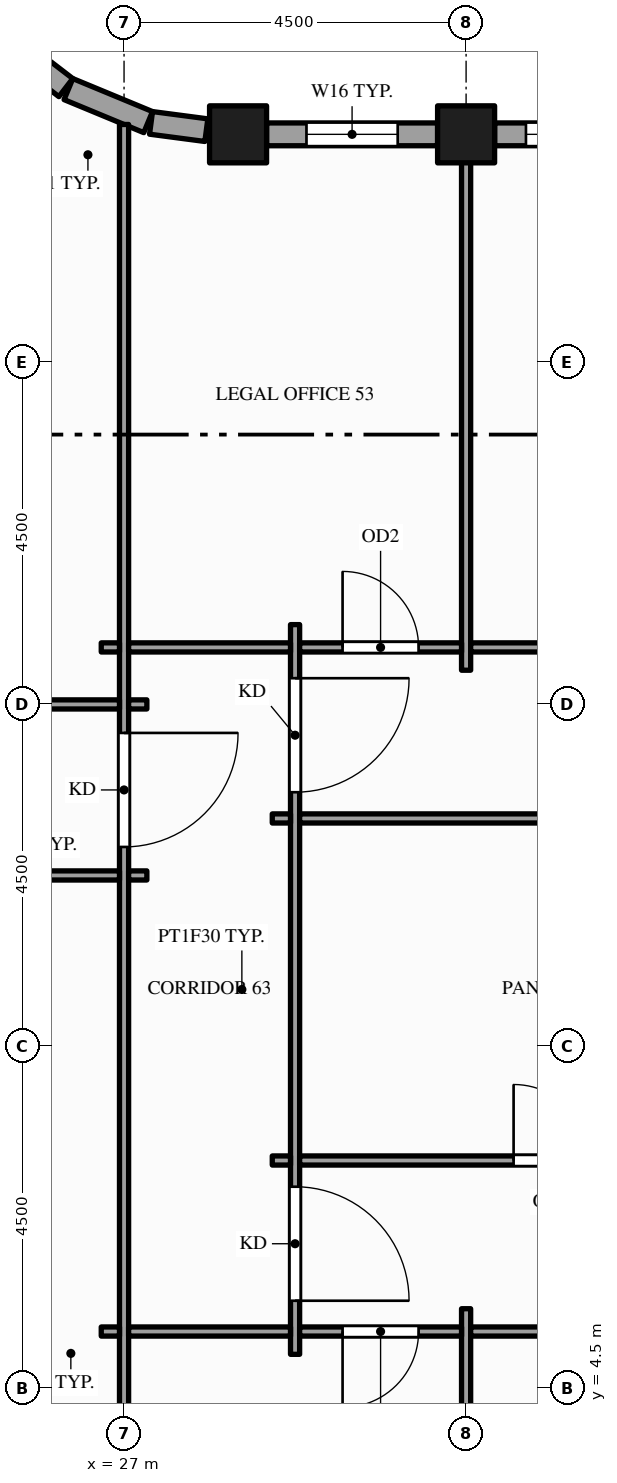
"""IFC4 building model, lengths in metres.
Left out: names, types, materials, properties, quantities, classifications, styles, units other than length and angle.
Written with IfcOpenShell. Run it as: python <this file> out.ifc"""

import sys

from ifc_helpers import new_model, si_unit, direction, frame, frame_2d, origin, origin_2d, place, context, subcontext, project, spatial, rectangle, hollow_rectangle, extrude, element, fill, save


model = new_model("IFC4")
c1 = context("Model", 3, precision=1e-05, world=origin(), true_north=direction((0.0, 1.0)))
c2 = subcontext(c1, "Body", "Model", "MODEL_VIEW")
j1 = project(units=[si_unit("LENGTHUNIT", "METRE"), si_unit("PLANEANGLEUNIT", "RADIAN")], contexts=[c1])
p1 = place(None, origin())
s1 = spatial("IfcSite", under=j1, at=p1, CompositionType="ELEMENT")
p2 = place(p1, origin())
s2 = spatial("IfcBuilding", under=s1, at=p2, CompositionType="ELEMENT")
p3 = place(p2, frame((0.0, 0.0, 207.0)))
s3 = spatial("IfcBuildingStorey", under=s2, at=p3, CompositionType="ELEMENT", Elevation=207.0)
for number, where, z_axis, x_axis in (
    (1, (28.5, 21.0, -0.15), (0.0, 0.0, 1.0), (1.0, 0.0, 0.0)),
    (2, (31.5, 21.0, -0.15), (0.0, 0.0, 1.0), (1.0, 0.0, 0.0)),
):
    element("IfcColumn", number, at=place(p3, frame(where, z_axis=z_axis, x_axis=x_axis)), inside=s3, PredefinedType="COLUMN", context=c2, shape_type="SweptSolid", body=[
        extrude(hollow_rectangle(XDim=0.75, YDim=0.75, WallThickness=0.036, at=origin_2d()), origin(), (0.0, 0.0, 1.0), 4.0),
    ])
p4 = place(p3, frame((35.625, 21.0, 0.0), z_axis=(0.0, 0.0, 1.0), x_axis=(-1.0, 0.0, 0.0)))
e3 = element("IfcWall", 3, at=p4, inside=s3, PredefinedType="STANDARD", context=c2, shape_type="SweptSolid", body=[
    extrude(rectangle(XDim=3.75, YDim=0.3, at=frame_2d((1.875, 0.0))), origin(), (0.0, 0.0, 1.0), 2.87),
])
p5 = place(p4, frame((0.413, 0.0, 0.9)))
e4 = element("IfcOpeningElement", 4, at=p5, cuts=e3, PredefinedType="OPENING", context=c2, shape_type="SweptSolid", body=[
    extrude(rectangle(XDim=1.15, YDim=1.75, at=frame_2d((0.575, 0.875))), frame((0.0, 0.16, 0.0), z_axis=(0.0, -1.0, 0.0), x_axis=(1.0, 0.0, 0.0)), (0.0, 0.0, 1.0), 0.32),
])
p6 = place(p4, frame((2.188, 0.0, 0.9)))
e5 = element("IfcOpeningElement", 5, at=p6, cuts=e3, PredefinedType="OPENING", context=c2, shape_type="SweptSolid", body=[
    extrude(rectangle(XDim=1.15, YDim=1.75, at=frame_2d((0.575, 0.875))), frame((0.0, 0.16, 0.0), z_axis=(0.0, -1.0, 0.0), x_axis=(1.0, 0.0, 0.0)), (0.0, 0.0, 1.0), 0.32),
])
p7 = place(p3, frame((31.125, 21.0, 0.0), z_axis=(0.0, 0.0, 1.0), x_axis=(-1.0, 0.0, 0.0)))
e6 = element("IfcWall", 6, at=p7, inside=s3, PredefinedType="STANDARD", context=c2, shape_type="SweptSolid", body=[
    extrude(rectangle(XDim=2.25, YDim=0.3, at=frame_2d((1.125, 0.0))), origin(), (0.0, 0.0, 1.0), 2.87),
])
p8 = place(p7, frame((0.525, 0.0, 0.9)))
e7 = element("IfcOpeningElement", 7, at=p8, cuts=e6, PredefinedType="OPENING", context=c2, shape_type="SweptSolid", body=[
    extrude(rectangle(XDim=1.2, YDim=1.75, at=frame_2d((0.6, 0.875))), frame((0.0, 0.16, 0.0), z_axis=(0.0, -1.0, 0.0), x_axis=(1.0, 0.0, 0.0)), (0.0, 0.0, 1.0), 0.32),
])
p9 = place(p3, frame((28.083, 21.055, 0.0), z_axis=(0.0, 0.0, 1.0), x_axis=(-0.99142711513, 0.130660917588, 0.0)))
e8 = element("IfcWall", 8, at=p9, inside=s3, PredefinedType="STANDARD", context=c2, shape_type="SweptSolid", body=[
    extrude(rectangle(XDim=0.734, YDim=0.3, at=frame_2d((0.367, 0.0))), origin(), (0.0, 0.0, 1.0), 3.157),
])
p10 = place(p3, frame((27.317, 21.161, 0.0), z_axis=(0.0, 0.0, 1.0), x_axis=(-0.923914616768, 0.382598720491, 0.0)))
e9 = element("IfcWall", 9, at=p10, inside=s3, PredefinedType="STANDARD", context=c2, shape_type="SweptSolid", body=[
    extrude(rectangle(XDim=1.135, YDim=0.3, at=frame_2d((0.568, 0.0))), origin(), (0.0, 0.0, 1.0), 2.87),
])
p11 = place(p3, frame((26.234, 21.615, 0.0), z_axis=(0.0, 0.0, 1.0), x_axis=(-0.793575131083, 0.608472276547, 0.0)))
e10 = element("IfcWall", 10, at=p11, inside=s3, PredefinedType="STANDARD", context=c2, shape_type="SweptSolid", body=[
    extrude(rectangle(XDim=0.629, YDim=0.3, at=frame_2d((0.314, 0.0))), origin(), (0.0, 0.0, 1.0), 3.157),
])
p12 = place(p3, frame((27.0, -1.35, 0.0), z_axis=(0.0, 0.0, 1.0), x_axis=(0.0, 1.0, 0.0)))
e11 = element("IfcWall", 11, at=p12, inside=s3, PredefinedType="PARTITIONING", context=c2, shape_type="SweptSolid", body=[
    extrude(rectangle(XDim=22.48, YDim=0.12, at=frame_2d((11.24, 0.0))), origin(), (0.0, 0.0, 1.0), 2.87),
])
p13 = place(p12, frame((12.975, 0.0, 0.0)))
e12 = element("IfcOpeningElement", 12, at=p13, cuts=e11, PredefinedType="OPENING", context=c2, shape_type="SweptSolid", body=[
    extrude(rectangle(XDim=1.5, YDim=2.1, at=frame_2d((0.75, 1.05))), frame((0.0, 0.07, 0.0), z_axis=(0.0, -1.0, 0.0), x_axis=(1.0, 0.0, 0.0)), (0.0, 0.0, 1.0), 0.14),
])
p14 = place(p3, frame((29.25, 4.95, 0.0), z_axis=(0.0, 0.0, 1.0), x_axis=(0.0, 1.0, 0.0)))
e13 = element("IfcWall", 13, at=p14, inside=s3, PredefinedType="PARTITIONING", context=c2, shape_type="SweptSolid", body=[
    extrude(rectangle(XDim=9.6, YDim=0.12, at=frame_2d((4.8, 0.0))), origin(), (0.0, 0.0, 1.0), 2.87),
])
p15 = place(p14, frame((0.705, 0.0, 0.0)))
e14 = element("IfcOpeningElement", 14, at=p15, cuts=e13, PredefinedType="OPENING", context=c2, shape_type="SweptSolid", body=[
    extrude(rectangle(XDim=1.5, YDim=2.1, at=frame_2d((0.75, 1.05))), frame((0.0, 0.07, 0.0), z_axis=(0.0, -1.0, 0.0), x_axis=(1.0, 0.0, 0.0)), (0.0, 0.0, 1.0), 0.14),
])
p16 = place(p14, frame((7.395, 0.0, 0.0)))
e15 = element("IfcOpeningElement", 15, at=p16, cuts=e13, PredefinedType="OPENING", context=c2, shape_type="SweptSolid", body=[
    extrude(rectangle(XDim=1.5, YDim=2.1, at=frame_2d((0.75, 1.05))), frame((0.0, 0.07, 0.0), z_axis=(0.0, -1.0, 0.0), x_axis=(1.0, 0.0, 0.0)), (0.0, 0.0, 1.0), 0.14),
])
for number, where, z_axis, x_axis in (
    (16, (31.5, -1.35, 0.0), (0.0, 0.0, 1.0), (0.0, 1.0, 0.0)),
    (17, (31.5, 13.95, 0.0), (0.0, 0.0, 1.0), (0.0, 1.0, 0.0)),
):
    element("IfcWall", number, at=place(p3, frame(where, z_axis=z_axis, x_axis=x_axis)), inside=s3, PredefinedType="PARTITIONING", context=c2, shape_type="SweptSolid", body=[
        extrude(rectangle(XDim=6.9, YDim=0.12, at=frame_2d((3.45, 0.0))), origin(), (0.0, 0.0, 1.0), 2.87),
    ])
p17 = place(p3, frame((26.7, 5.25, 0.0), z_axis=(0.0, 0.0, 1.0), x_axis=(1.0, 0.0, 0.0)))
e18 = element("IfcWall", 18, at=p17, inside=s3, PredefinedType="PARTITIONING", context=c2, shape_type="SweptSolid", body=[
    extrude(rectangle(XDim=0.24, YDim=0.12, at=frame_2d((0.12, 0.0))), origin(), (0.0, 0.0, 1.0), 2.87),
])
p18 = place(p3, frame((27.06, 5.25, 0.0), z_axis=(0.0, 0.0, 1.0), x_axis=(1.0, 0.0, 0.0)))
e19 = element("IfcWall", 19, at=p18, inside=s3, PredefinedType="PARTITIONING", context=c2, shape_type="SweptSolid", body=[
    extrude(rectangle(XDim=2.13, YDim=0.12, at=frame_2d((1.065, 0.0))), origin(), (0.0, 0.0, 1.0), 2.87),
])
p19 = place(p3, frame((29.31, 5.25, 0.0), z_axis=(0.0, 0.0, 1.0), x_axis=(1.0, 0.0, 0.0)))
e20 = element("IfcWall", 20, at=p19, inside=s3, PredefinedType="PARTITIONING", context=c2, shape_type="SweptSolid", body=[
    extrude(rectangle(XDim=2.13, YDim=0.12, at=frame_2d((1.065, 0.0))), origin(), (0.0, 0.0, 1.0), 2.87),
])
p20 = place(p19, frame((0.565, 0.0, 0.0)))
e21 = element("IfcOpeningElement", 21, at=p20, cuts=e20, PredefinedType="OPENING", context=c2, shape_type="SweptSolid", body=[
    extrude(rectangle(XDim=1.0, YDim=2.1, at=frame_2d((0.5, 1.05))), frame((0.0, 0.07, 0.0), z_axis=(0.0, -1.0, 0.0), x_axis=(1.0, 0.0, 0.0)), (0.0, 0.0, 1.0), 0.14),
])
p21 = place(p3, frame((31.56, 5.25, 0.0), z_axis=(0.0, 0.0, 1.0), x_axis=(1.0, 0.0, 0.0)))
e22 = element("IfcWall", 22, at=p21, inside=s3, PredefinedType="PARTITIONING", context=c2, shape_type="SweptSolid", body=[
    extrude(rectangle(XDim=4.38, YDim=0.12, at=frame_2d((2.19, 0.0))), origin(), (0.0, 0.0, 1.0), 2.87),
])
p22 = place(p21, frame((1.69, 0.0, 0.0)))
e23 = element("IfcOpeningElement", 23, at=p22, cuts=e22, PredefinedType="OPENING", context=c2, shape_type="SweptSolid", body=[
    extrude(rectangle(XDim=1.0, YDim=2.1, at=frame_2d((0.5, 1.05))), frame((0.0, 0.07, 0.0), z_axis=(0.0, -1.0, 0.0), x_axis=(1.0, 0.0, 0.0)), (0.0, 0.0, 1.0), 0.14),
])
p23 = place(p3, frame((28.95, 7.5, 0.0), z_axis=(0.0, 0.0, 1.0), x_axis=(1.0, 0.0, 0.0)))
e24 = element("IfcWall", 24, at=p23, inside=s3, PredefinedType="PARTITIONING", context=c2, shape_type="SweptSolid", body=[
    extrude(rectangle(XDim=0.24, YDim=0.12, at=frame_2d((0.12, 0.0))), origin(), (0.0, 0.0, 1.0), 2.87),
])
p24 = place(p3, frame((29.31, 7.5, 0.0), z_axis=(0.0, 0.0, 1.0), x_axis=(1.0, 0.0, 0.0)))
e25 = element("IfcWall", 25, at=p24, inside=s3, PredefinedType="PARTITIONING", context=c2, shape_type="SweptSolid", body=[
    extrude(rectangle(XDim=6.63, YDim=0.12, at=frame_2d((3.315, 0.0))), origin(), (0.0, 0.0, 1.0), 2.87),
])
p25 = place(p24, frame((2.815, 0.0, 0.0)))
e26 = element("IfcOpeningElement", 26, at=p25, cuts=e25, PredefinedType="OPENING", context=c2, shape_type="SweptSolid", body=[
    extrude(rectangle(XDim=1.0, YDim=2.1, at=frame_2d((0.5, 1.05))), frame((0.0, 0.07, 0.0), z_axis=(0.0, -1.0, 0.0), x_axis=(1.0, 0.0, 0.0)), (0.0, 0.0, 1.0), 0.14),
])
p26 = place(p3, frame((20.31, 11.25, 0.0), z_axis=(0.0, 0.0, 1.0), x_axis=(1.0, 0.0, 0.0)))
e27 = element("IfcWall", 27, at=p26, inside=s3, PredefinedType="PARTITIONING", context=c2, shape_type="SweptSolid", body=[
    extrude(rectangle(XDim=6.63, YDim=0.12, at=frame_2d((3.315, 0.0))), origin(), (0.0, 0.0, 1.0), 2.76),
])
p27 = place(p26, frame((2.865, 0.0, 0.0)))
e28 = element("IfcOpeningElement", 28, at=p27, cuts=e27, PredefinedType="OPENING", context=c2, shape_type="SweptSolid", body=[
    extrude(rectangle(XDim=0.9, YDim=2.1, at=frame_2d((0.45, 1.05))), frame((0.0, 0.07, 0.0), z_axis=(0.0, -1.0, 0.0), x_axis=(1.0, 0.0, 0.0)), (0.0, 0.0, 1.0), 0.14),
])
for number, where, z_axis, x_axis in (
    (29, (27.06, 11.25, 0.0), (0.0, 0.0, 1.0), (1.0, 0.0, 0.0)),
    (30, (28.95, 12.0, 0.0), (0.0, 0.0, 1.0), (1.0, 0.0, 0.0)),
):
    element("IfcWall", number, at=place(p3, frame(where, z_axis=z_axis, x_axis=x_axis)), inside=s3, PredefinedType="PARTITIONING", context=c2, shape_type="SweptSolid", body=[
        extrude(rectangle(XDim=0.24, YDim=0.12, at=frame_2d((0.12, 0.0))), origin(), (0.0, 0.0, 1.0), 2.87),
    ])
p28 = place(p3, frame((29.31, 12.0, 0.0), z_axis=(0.0, 0.0, 1.0), x_axis=(1.0, 0.0, 0.0)))
e31 = element("IfcWall", 31, at=p28, inside=s3, PredefinedType="PARTITIONING", context=c2, shape_type="SweptSolid", body=[
    extrude(rectangle(XDim=6.63, YDim=0.12, at=frame_2d((3.315, 0.0))), origin(), (0.0, 0.0, 1.0), 2.87),
])
p29 = place(p3, frame((13.56, 13.5, 0.0), z_axis=(0.0, 0.0, 1.0), x_axis=(1.0, 0.0, 0.0)))
e32 = element("IfcWall", 32, at=p29, inside=s3, PredefinedType="PARTITIONING", context=c2, shape_type="SweptSolid", body=[
    extrude(rectangle(XDim=13.38, YDim=0.12, at=frame_2d((6.69, 0.0))), origin(), (0.0, 0.0, 1.0), 2.76),
])
p30 = place(p29, frame((3.54, 0.0, 0.0)))
e33 = element("IfcOpeningElement", 33, at=p30, cuts=e32, PredefinedType="OPENING", context=c2, shape_type="SweptSolid", body=[
    extrude(rectangle(XDim=1.8, YDim=2.1, at=frame_2d((0.9, 1.05))), frame((0.0, 0.07, 0.0), z_axis=(0.0, -1.0, 0.0), x_axis=(1.0, 0.0, 0.0)), (0.0, 0.0, 1.0), 0.14),
])
for number, where, z_axis, x_axis in (
    (34, (27.06, 13.5, 0.0), (0.0, 0.0, 1.0), (1.0, 0.0, 0.0)),
    (35, (26.7, 14.25, 0.0), (0.0, 0.0, 1.0), (1.0, 0.0, 0.0)),
):
    element("IfcWall", number, at=place(p3, frame(where, z_axis=z_axis, x_axis=x_axis)), inside=s3, PredefinedType="PARTITIONING", context=c2, shape_type="SweptSolid", body=[
        extrude(rectangle(XDim=0.24, YDim=0.12, at=frame_2d((0.12, 0.0))), origin(), (0.0, 0.0, 1.0), 2.87),
    ])
p31 = place(p3, frame((27.06, 14.25, 0.0), z_axis=(0.0, 0.0, 1.0), x_axis=(1.0, 0.0, 0.0)))
e36 = element("IfcWall", 36, at=p31, inside=s3, PredefinedType="PARTITIONING", context=c2, shape_type="SweptSolid", body=[
    extrude(rectangle(XDim=2.13, YDim=0.12, at=frame_2d((1.065, 0.0))), origin(), (0.0, 0.0, 1.0), 2.87),
])
p32 = place(p3, frame((29.31, 14.25, 0.0), z_axis=(0.0, 0.0, 1.0), x_axis=(1.0, 0.0, 0.0)))
e37 = element("IfcWall", 37, at=p32, inside=s3, PredefinedType="PARTITIONING", context=c2, shape_type="SweptSolid", body=[
    extrude(rectangle(XDim=2.13, YDim=0.12, at=frame_2d((1.065, 0.0))), origin(), (0.0, 0.0, 1.0), 2.87),
])
p33 = place(p32, frame((0.565, 0.0, 0.0)))
e38 = element("IfcOpeningElement", 38, at=p33, cuts=e37, PredefinedType="OPENING", context=c2, shape_type="SweptSolid", body=[
    extrude(rectangle(XDim=1.0, YDim=2.1, at=frame_2d((0.5, 1.05))), frame((0.0, 0.07, 0.0), z_axis=(0.0, -1.0, 0.0), x_axis=(1.0, 0.0, 0.0)), (0.0, 0.0, 1.0), 0.14),
])
p34 = place(p3, frame((31.56, 14.25, 0.0), z_axis=(0.0, 0.0, 1.0), x_axis=(1.0, 0.0, 0.0)))
e39 = element("IfcWall", 39, at=p34, inside=s3, PredefinedType="PARTITIONING", context=c2, shape_type="SweptSolid", body=[
    extrude(rectangle(XDim=4.38, YDim=0.12, at=frame_2d((2.19, 0.0))), origin(), (0.0, 0.0, 1.0), 2.87),
])
p35 = place(p34, frame((1.69, 0.0, 0.0)))
e40 = element("IfcOpeningElement", 40, at=p35, cuts=e39, PredefinedType="OPENING", context=c2, shape_type="SweptSolid", body=[
    extrude(rectangle(XDim=1.0, YDim=2.1, at=frame_2d((0.5, 1.05))), frame((0.0, 0.07, 0.0), z_axis=(0.0, -1.0, 0.0), x_axis=(1.0, 0.0, 0.0)), (0.0, 0.0, 1.0), 0.14),
])
p36 = place(p6, origin())
e41 = element("IfcWindow", 41, at=p36, inside=s3, PartitioningType="SINGLE_PANEL", PredefinedType="WINDOW", context=c2, shape_type="SweptSolid", body=[
    extrude(rectangle(XDim=1.15, YDim=1.75, at=frame_2d((0.575, 0.875))), frame((0.0, 0.03, 0.0), z_axis=(0.0, -1.0, 0.0), x_axis=(1.0, 0.0, 0.0)), (0.0, 0.0, 1.0), 0.06),
])
fill(e5, e41)
p37 = place(p8, origin())
e42 = element("IfcWindow", 42, at=p37, inside=s3, PartitioningType="SINGLE_PANEL", PredefinedType="WINDOW", context=c2, shape_type="SweptSolid", body=[
    extrude(rectangle(XDim=1.2, YDim=1.75, at=frame_2d((0.6, 0.875))), frame((0.0, 0.03, 0.0), z_axis=(0.0, -1.0, 0.0), x_axis=(1.0, 0.0, 0.0)), (0.0, 0.0, 1.0), 0.06),
])
fill(e7, e42)
p38 = place(p13, origin())
e43 = element("IfcDoor", 43, at=p38, inside=s3, OperationType="SINGLE_SWING_RIGHT", PredefinedType="DOOR", context=c2, shape_type="SweptSolid", body=[
    extrude(rectangle(XDim=1.5, YDim=2.1, at=frame_2d((0.75, 1.05))), frame((0.0, 0.025, 0.0), z_axis=(0.0, -1.0, 0.0), x_axis=(1.0, 0.0, 0.0)), (0.0, 0.0, 1.0), 0.05),
])
fill(e12, e43)
p39 = place(p15, origin())
e44 = element("IfcDoor", 44, at=p39, inside=s3, OperationType="SINGLE_SWING_LEFT", PredefinedType="DOOR", context=c2, shape_type="SweptSolid", body=[
    extrude(rectangle(XDim=1.5, YDim=2.1, at=frame_2d((0.75, 1.05))), frame((0.0, 0.025, 0.0), z_axis=(0.0, -1.0, 0.0), x_axis=(1.0, 0.0, 0.0)), (0.0, 0.0, 1.0), 0.05),
])
fill(e14, e44)
p40 = place(p16, origin())
e45 = element("IfcDoor", 45, at=p40, inside=s3, OperationType="SINGLE_SWING_RIGHT", PredefinedType="DOOR", context=c2, shape_type="SweptSolid", body=[
    extrude(rectangle(XDim=1.5, YDim=2.1, at=frame_2d((0.75, 1.05))), frame((0.0, 0.025, 0.0), z_axis=(0.0, -1.0, 0.0), x_axis=(1.0, 0.0, 0.0)), (0.0, 0.0, 1.0), 0.05),
])
fill(e15, e45)
p41 = place(p25, origin())
e46 = element("IfcDoor", 46, at=p41, inside=s3, OperationType="SINGLE_SWING_LEFT", PredefinedType="DOOR", context=c2, shape_type="SweptSolid", body=[
    extrude(rectangle(XDim=1.0, YDim=2.1, at=frame_2d((0.5, 1.05))), frame((0.0, 0.025, 0.0), z_axis=(0.0, -1.0, 0.0), x_axis=(1.0, 0.0, 0.0)), (0.0, 0.0, 1.0), 0.05),
])
fill(e26, e46)
p42 = place(p20, origin())
e47 = element("IfcDoor", 47, at=p42, inside=s3, OperationType="SINGLE_SWING_LEFT", PredefinedType="DOOR", context=c2, shape_type="SweptSolid", body=[
    extrude(rectangle(XDim=1.0, YDim=2.1, at=frame_2d((0.5, 1.05))), frame((0.0, 0.025, 0.0), z_axis=(0.0, -1.0, 0.0), x_axis=(1.0, 0.0, 0.0)), (0.0, 0.0, 1.0), 0.05),
])
fill(e21, e47)
p43 = place(p33, origin())
e48 = element("IfcDoor", 48, at=p43, inside=s3, OperationType="SINGLE_SWING_LEFT", PredefinedType="DOOR", context=c2, shape_type="SweptSolid", body=[
    extrude(rectangle(XDim=1.0, YDim=2.1, at=frame_2d((0.5, 1.05))), frame((0.0, 0.025, 0.0), z_axis=(0.0, -1.0, 0.0), x_axis=(1.0, 0.0, 0.0)), (0.0, 0.0, 1.0), 0.05),
])
fill(e38, e48)
save(model, sys.argv[1])
